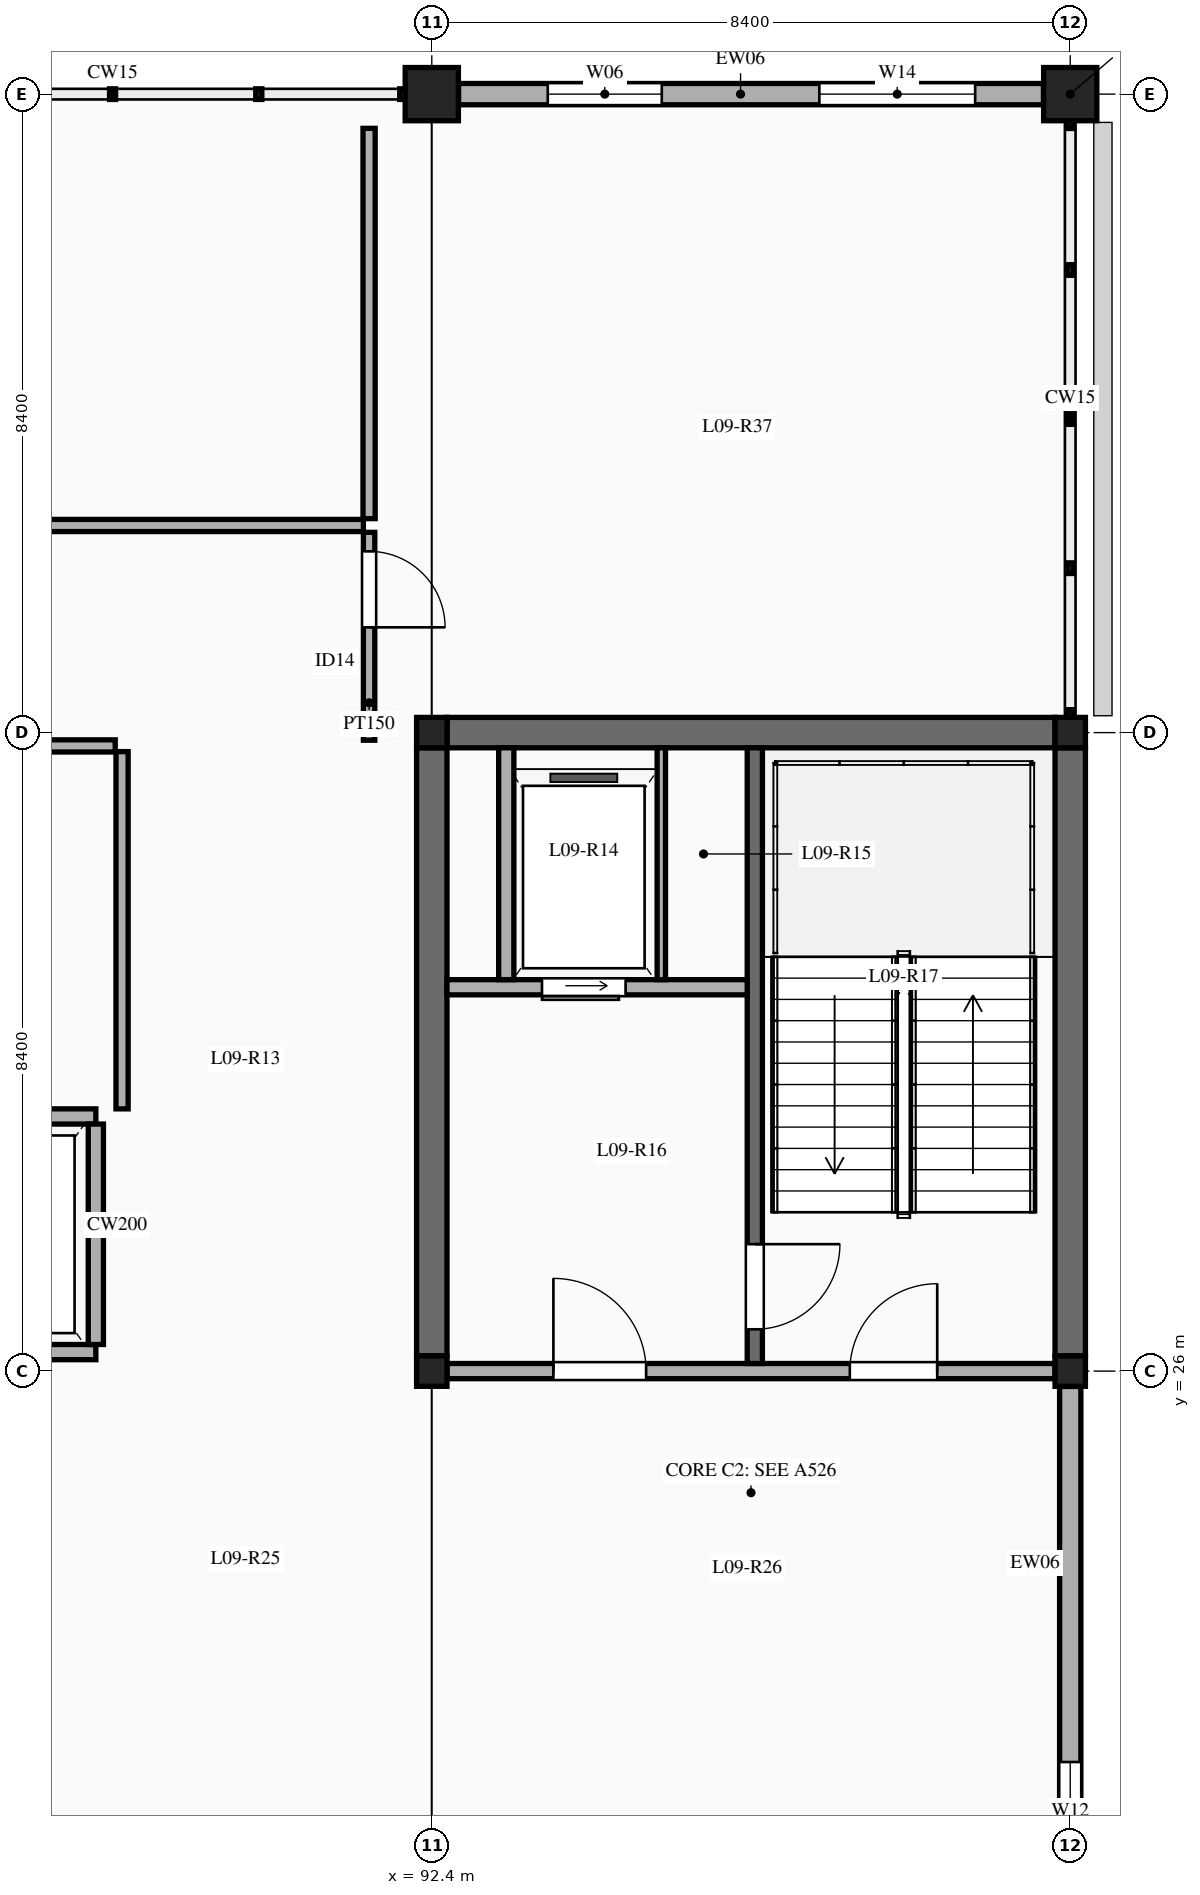
"""IFC4 building model, lengths in metres.
Left out: names, types, materials, properties, quantities, classifications, styles, units other than length and angle.
Written with IfcOpenShell. Run it as: python <this file> out.ifc"""

import sys

from ifc_helpers import new_model, si_unit, direction, frame, frame_2d, origin, origin_2d, place, context, subcontext, project, spatial, rectangle, extrude, element, fill, save


model = new_model("IFC4")
c1 = context("Model", 3, precision=1e-05, world=origin(), true_north=direction((0.0, 1.0)))
c2 = subcontext(c1, "Body", "Model", "MODEL_VIEW")
j1 = project(units=[si_unit("LENGTHUNIT", "METRE"), si_unit("PLANEANGLEUNIT", "RADIAN")], contexts=[c1])
p1 = place(None, origin())
s1 = spatial("IfcSite", under=j1, at=p1, CompositionType="ELEMENT")
p2 = place(p1, origin())
s2 = spatial("IfcBuilding", under=s1, at=p2, CompositionType="ELEMENT")
p3 = place(p2, frame((0.0, 0.0, 42.0)))
s3 = spatial("IfcBuildingStorey", under=s2, at=p3, CompositionType="ELEMENT", Elevation=42.0)
for number, where, z_axis, x_axis in (
    (1, (92.4, 26.0, 0.0), (0.0, 0.0, 1.0), (1.0, 0.0, 0.0)),
    (2, (92.4, 34.4, 0.0), (0.0, 0.0, 1.0), (1.0, 0.0, 0.0)),
):
    element("IfcColumn", number, at=place(p3, frame(where, z_axis=z_axis, x_axis=x_axis)), inside=s3, PredefinedType="COLUMN", context=c2, shape_type="SweptSolid", body=[
        extrude(rectangle(XDim=0.4, YDim=0.4, at=origin_2d()), origin(), (0.0, 0.0, 1.0), 4.5),
    ])
p4 = place(p3, frame((92.4, 42.8, 0.0), z_axis=(0.0, 0.0, 1.0), x_axis=(1.0, 0.0, 0.0)))
e3 = element("IfcColumn", 3, at=p4, inside=s3, PredefinedType="COLUMN", context=c2, shape_type="SweptSolid", body=[
    extrude(rectangle(XDim=0.7, YDim=0.7, at=origin_2d()), origin(), (0.0, 0.0, 1.0), 4.5),
])
for number, where, z_axis, x_axis in (
    (4, (100.8, 26.0, 0.0), (0.0, 0.0, 1.0), (1.0, 0.0, 0.0)),
    (5, (100.8, 34.4, 0.0), (0.0, 0.0, 1.0), (1.0, 0.0, 0.0)),
):
    element("IfcColumn", number, at=place(p3, frame(where, z_axis=z_axis, x_axis=x_axis)), inside=s3, PredefinedType="COLUMN", context=c2, shape_type="SweptSolid", body=[
        extrude(rectangle(XDim=0.4, YDim=0.4, at=origin_2d()), origin(), (0.0, 0.0, 1.0), 4.5),
    ])
p5 = place(p3, frame((100.8, 42.8, 0.0), z_axis=(0.0, 0.0, 1.0), x_axis=(1.0, 0.0, 0.0)))
e6 = element("IfcColumn", 6, at=p5, inside=s3, PredefinedType="COLUMN", context=c2, shape_type="SweptSolid", body=[
    extrude(rectangle(XDim=0.7, YDim=0.7, at=origin_2d()), origin(), (0.0, 0.0, 1.0), 4.5),
])
for number, where, z_axis, x_axis in (
    (7, (92.4, 26.2, 0.0), (0.0, 0.0, 1.0), (0.0, 1.0, 0.0)),
    (8, (100.8, 26.2, 0.0), (0.0, 0.0, 1.0), (0.0, 1.0, 0.0)),
    (9, (92.6, 34.4, 0.0), (0.0, 0.0, 1.0), (1.0, 0.0, 0.0)),
):
    element("IfcWall", number, at=place(p3, frame(where, z_axis=z_axis, x_axis=x_axis)), inside=s3, PredefinedType="SHEAR", context=c2, shape_type="SweptSolid", body=[
        extrude(rectangle(XDim=8.0, YDim=0.4, at=frame_2d((4.0, 0.0))), origin(), (0.0, 0.0, 1.0), 4.5),
    ])
p6 = place(p3, frame((92.752, 42.8, 0.0), z_axis=(0.0, 0.0, 1.0), x_axis=(1.0, 0.0, 0.0)))
e10 = element("IfcWall", 10, at=p6, inside=s3, PredefinedType="ELEMENTEDWALL", context=c2, shape_type="SweptSolid", body=[
    extrude(rectangle(XDim=7.696, YDim=0.28, at=frame_2d((3.848, 0.0))), origin(), (0.0, 0.0, 1.0), 3.55),
])
p7 = place(p6, frame((1.174, 0.0, 0.9)))
e11 = element("IfcOpeningElement", 11, at=p7, cuts=e10, PredefinedType="OPENING", context=c2, shape_type="SweptSolid", body=[
    extrude(rectangle(XDim=1.5, YDim=2.0, at=frame_2d((0.75, 1.0))), frame((0.0, 0.15, 0.0), z_axis=(0.0, -1.0, 0.0), x_axis=(1.0, 0.0, 0.0)), (0.0, 0.0, 1.0), 0.3),
])
p8 = place(p6, frame((4.747, 0.0, 0.9)))
e12 = element("IfcOpeningElement", 12, at=p8, cuts=e10, PredefinedType="OPENING", context=c2, shape_type="SweptSolid", body=[
    extrude(rectangle(XDim=2.05, YDim=2.1, at=frame_2d((1.025, 1.05))), frame((0.0, 0.15, 0.0), z_axis=(0.0, -1.0, 0.0), x_axis=(1.0, 0.0, 0.0)), (0.0, 0.0, 1.0), 0.3),
])
p9 = place(p3, frame((100.8, 17.977, 0.0), z_axis=(0.0, 0.0, 1.0), x_axis=(0.0, 1.0, 0.0)))
e13 = element("IfcWall", 13, at=p9, inside=s3, PredefinedType="ELEMENTEDWALL", context=c2, shape_type="SweptSolid", body=[
    extrude(rectangle(XDim=7.821, YDim=0.28, at=frame_2d((3.911, 0.0))), origin(), (0.0, 0.0, 1.0), 3.55),
])
p10 = place(p9, frame((1.03, 0.0, 0.9)))
e14 = element("IfcOpeningElement", 14, at=p10, cuts=e13, PredefinedType="OPENING", context=c2, shape_type="SweptSolid", body=[
    extrude(rectangle(XDim=1.85, YDim=2.05, at=frame_2d((0.925, 1.025))), frame((0.0, 0.15, 0.0), z_axis=(0.0, -1.0, 0.0), x_axis=(1.0, 0.0, 0.0)), (0.0, 0.0, 1.0), 0.3),
])
p11 = place(p3, frame((92.6, 26.0, 0.0), z_axis=(0.0, 0.0, 1.0), x_axis=(1.0, 0.0, 0.0)))
e15 = element("IfcWall", 15, at=p11, inside=s3, PredefinedType="SOLIDWALL", context=c2, shape_type="SweptSolid", body=[
    extrude(rectangle(XDim=8.0, YDim=0.2, at=frame_2d((4.0, 0.0))), origin(), (0.0, 0.0, 1.0), 3.78),
])
p12 = place(p11, frame((1.4, 0.0, 0.0)))
e16 = element("IfcOpeningElement", 16, at=p12, cuts=e15, PredefinedType="OPENING", context=c2, shape_type="SweptSolid", body=[
    extrude(rectangle(XDim=1.22, YDim=2.15, at=frame_2d((0.61, 1.075))), frame((0.0, 0.11, 0.0), z_axis=(0.0, -1.0, 0.0), x_axis=(1.0, 0.0, 0.0)), (0.0, 0.0, 1.0), 0.22),
])
p13 = place(p11, frame((5.3, 0.0, 0.0)))
e17 = element("IfcOpeningElement", 17, at=p13, cuts=e15, PredefinedType="OPENING", context=c2, shape_type="SweptSolid", body=[
    extrude(rectangle(XDim=1.15, YDim=2.15, at=frame_2d((0.575, 1.075))), frame((0.0, 0.11, 0.0), z_axis=(0.0, -1.0, 0.0), x_axis=(1.0, 0.0, 0.0)), (0.0, 0.0, 1.0), 0.22),
])
p14 = place(p3, frame((96.65, 26.1, 0.0), z_axis=(0.0, 0.0, 1.0), x_axis=(0.0, 1.0, 0.0)))
e18 = element("IfcWall", 18, at=p14, inside=s3, PredefinedType="SOLIDWALL", context=c2, shape_type="SweptSolid", body=[
    extrude(rectangle(XDim=8.1, YDim=0.2, at=frame_2d((4.05, 0.0))), origin(), (0.0, 0.0, 1.0), 4.3),
])
p15 = place(p14, frame((0.45, 0.0, 0.0)))
e19 = element("IfcOpeningElement", 19, at=p15, cuts=e18, PredefinedType="OPENING", context=c2, shape_type="SweptSolid", body=[
    extrude(rectangle(XDim=1.12, YDim=2.15, at=frame_2d((0.56, 1.075))), frame((0.0, 0.11, 0.0), z_axis=(0.0, -1.0, 0.0), x_axis=(1.0, 0.0, 0.0)), (0.0, 0.0, 1.0), 0.22),
])
p16 = place(p3, frame((92.6, 31.05, 0.0), z_axis=(0.0, 0.0, 1.0), x_axis=(1.0, 0.0, 0.0)))
e20 = element("IfcWall", 20, at=p16, inside=s3, PredefinedType="SOLIDWALL", context=c2, shape_type="SweptSolid", body=[
    extrude(rectangle(XDim=3.95, YDim=0.2, at=frame_2d((1.975, 0.0))), origin(), (0.0, 0.0, 1.0), 4.3),
])
p17 = place(p16, frame((1.25, 0.0, 0.0)))
e21 = element("IfcOpeningElement", 21, at=p17, cuts=e20, PredefinedType="OPENING", context=c2, shape_type="SweptSolid", body=[
    extrude(rectangle(XDim=1.1, YDim=2.15, at=frame_2d((0.55, 1.075))), frame((0.0, 0.11, 0.0), z_axis=(0.0, -1.0, 0.0), x_axis=(1.0, 0.0, 0.0)), (0.0, 0.0, 1.0), 0.22),
])
p18 = place(p3, frame((95.42, 31.15, 0.0), z_axis=(0.0, 0.0, 1.0), x_axis=(0.0, 1.0, 0.0)))
e22 = element("IfcWall", 22, at=p18, inside=s3, PredefinedType="PARTITIONING", context=c2, shape_type="SweptSolid", body=[
    extrude(rectangle(XDim=3.05, YDim=0.11, at=frame_2d((1.525, 0.0))), origin(), (0.0, 0.0, 1.0), 4.3),
])
p19 = place(p3, frame((93.38, 31.15, 0.0), z_axis=(0.0, 0.0, 1.0), x_axis=(0.0, 1.0, 0.0)))
e23 = element("IfcWall", 23, at=p19, inside=s3, PredefinedType="SOLIDWALL", context=c2, shape_type="SweptSolid", body=[
    extrude(rectangle(XDim=3.05, YDim=0.2, at=frame_2d((1.525, 0.0))), origin(), (0.0, 0.0, 1.0), 4.3),
])
p20 = place(p3, frame((85.62, 26.25, 0.0), z_axis=(0.0, 0.0, 1.0), x_axis=(1.0, 0.0, 0.0)))
e24 = element("IfcWall", 24, at=p20, inside=s3, PredefinedType="SOLIDWALL", context=c2, shape_type="SweptSolid", body=[
    extrude(rectangle(XDim=2.36, YDim=0.2, at=frame_2d((1.18, 0.0))), origin(), (0.0, 0.0, 1.0), 3.78),
])
p21 = place(p20, frame((0.605, 0.0, 0.0)))
e25 = element("IfcOpeningElement", 25, at=p21, cuts=e24, PredefinedType="OPENING", context=c2, shape_type="SweptSolid", body=[
    extrude(rectangle(XDim=1.15, YDim=2.2, at=frame_2d((0.575, 1.1))), frame((0.0, 0.11, 0.0), z_axis=(0.0, -1.0, 0.0), x_axis=(1.0, 0.0, 0.0)), (0.0, 0.0, 1.0), 0.22),
])
p22 = place(p3, frame((85.62, 29.35, 0.0), z_axis=(0.0, 0.0, 1.0), x_axis=(1.0, 0.0, 0.0)))
e26 = element("IfcWall", 26, at=p22, inside=s3, PredefinedType="SOLIDWALL", context=c2, shape_type="SweptSolid", body=[
    extrude(rectangle(XDim=2.36, YDim=0.2, at=frame_2d((1.18, 0.0))), origin(), (0.0, 0.0, 1.0), 4.3),
])
p23 = place(p3, frame((87.98, 26.35, 0.0), z_axis=(0.0, 0.0, 1.0), x_axis=(0.0, 1.0, 0.0)))
e27 = element("IfcWall", 27, at=p23, inside=s3, PredefinedType="SOLIDWALL", context=c2, shape_type="SweptSolid", body=[
    extrude(rectangle(XDim=2.9, YDim=0.2, at=frame_2d((1.45, 0.0))), origin(), (0.0, 0.0, 1.0), 4.03),
])
p24 = place(p3, frame((88.325, 29.45, 0.0), z_axis=(0.0, 0.0, 1.0), x_axis=(0.0, 1.0, 0.0)))
e28 = element("IfcWall", 28, at=p24, inside=s3, PredefinedType="PARTITIONING", context=c2, shape_type="SweptSolid", body=[
    extrude(rectangle(XDim=4.7, YDim=0.16, at=frame_2d((2.35, 0.0))), origin(), (0.0, 0.0, 1.0), 3.45),
])
p25 = place(p3, frame((84.405, 34.225, 0.0), z_axis=(0.0, 0.0, 1.0), x_axis=(1.0, 0.0, 0.0)))
e29 = element("IfcWall", 29, at=p25, inside=s3, PredefinedType="PARTITIONING", context=c2, shape_type="SweptSolid", body=[
    extrude(rectangle(XDim=3.83, YDim=0.16, at=frame_2d((1.915, 0.0))), origin(), (0.0, 0.0, 1.0), 3.45),
])
p26 = place(p3, frame((81.35, 37.125, 0.0), z_axis=(0.0, 0.0, 1.0), x_axis=(1.0, 0.0, 0.0)))
e30 = element("IfcWall", 30, at=p26, inside=s3, PredefinedType="PARTITIONING", context=c2, shape_type="SweptSolid", body=[
    extrude(rectangle(XDim=10.15, YDim=0.16, at=frame_2d((5.075, 0.0))), origin(), (0.0, 0.0, 1.0), 3.45),
])
p27 = place(p26, frame((4.922, 0.0, 0.0)))
e31 = element("IfcOpeningElement", 31, at=p27, cuts=e30, PredefinedType="OPENING", context=c2, shape_type="SweptSolid", body=[
    extrude(rectangle(XDim=1.06, YDim=2.18, at=frame_2d((0.53, 1.09))), frame((0.0, 0.09, 0.0), z_axis=(0.0, -1.0, 0.0), x_axis=(1.0, 0.0, 0.0)), (0.0, 0.0, 1.0), 0.18),
])
p28 = place(p3, frame((91.575, 34.3, 0.0), z_axis=(0.0, 0.0, 1.0), x_axis=(0.0, 1.0, 0.0)))
e32 = element("IfcWall", 32, at=p28, inside=s3, PredefinedType="PARTITIONING", context=c2, shape_type="SweptSolid", body=[
    extrude(rectangle(XDim=2.735, YDim=0.15, at=frame_2d((1.367, 0.0))), origin(), (0.0, 0.0, 1.0), 3.45),
])
p29 = place(p28, frame((1.485, 0.0, 0.0)))
e33 = element("IfcOpeningElement", 33, at=p29, cuts=e32, PredefinedType="OPENING", context=c2, shape_type="SweptSolid", body=[
    extrude(rectangle(XDim=1.0, YDim=2.15, at=frame_2d((0.5, 1.075))), frame((0.0, 0.085, 0.0), z_axis=(0.0, -1.0, 0.0), x_axis=(1.0, 0.0, 0.0)), (0.0, 0.0, 1.0), 0.17),
])
p30 = place(p3, frame((91.575, 37.215, 0.0), z_axis=(0.0, 0.0, 1.0), x_axis=(0.0, 1.0, 0.0)))
e34 = element("IfcWall", 34, at=p30, inside=s3, PredefinedType="PARTITIONING", context=c2, shape_type="SweptSolid", body=[
    extrude(rectangle(XDim=5.135, YDim=0.16, at=frame_2d((2.567, 0.0))), origin(), (0.0, 0.0, 1.0), 3.45),
])
p31 = place(p7, origin())
e35 = element("IfcWindow", 35, at=p31, inside=s3, PartitioningType="DOUBLE_PANEL_VERTICAL", PredefinedType="WINDOW", context=c2, shape_type="SweptSolid", body=[
    extrude(rectangle(XDim=1.5, YDim=2.0, at=frame_2d((0.75, 1.0))), frame((0.0, 0.03, 0.0), z_axis=(0.0, -1.0, 0.0), x_axis=(1.0, 0.0, 0.0)), (0.0, 0.0, 1.0), 0.06),
])
fill(e11, e35)
p32 = place(p8, origin())
e36 = element("IfcWindow", 36, at=p32, inside=s3, PartitioningType="TRIPLE_PANEL_VERTICAL", PredefinedType="WINDOW", context=c2, shape_type="SweptSolid", body=[
    extrude(rectangle(XDim=2.05, YDim=2.1, at=frame_2d((1.025, 1.05))), frame((0.0, 0.03, 0.0), z_axis=(0.0, -1.0, 0.0), x_axis=(1.0, 0.0, 0.0)), (0.0, 0.0, 1.0), 0.06),
])
fill(e12, e36)
p33 = place(p10, origin())
e37 = element("IfcWindow", 37, at=p33, inside=s3, PartitioningType="DOUBLE_PANEL_HORIZONTAL", PredefinedType="WINDOW", context=c2, shape_type="SweptSolid", body=[
    extrude(rectangle(XDim=1.85, YDim=2.05, at=frame_2d((0.925, 1.025))), frame((0.0, 0.03, 0.0), z_axis=(0.0, -1.0, 0.0), x_axis=(1.0, 0.0, 0.0)), (0.0, 0.0, 1.0), 0.06),
])
fill(e14, e37)
p34 = place(p12, origin())
e38 = element("IfcDoor", 38, at=p34, inside=s3, OperationType="SINGLE_SWING_LEFT", PredefinedType="DOOR", context=c2, shape_type="SweptSolid", body=[
    extrude(rectangle(XDim=1.22, YDim=2.15, at=frame_2d((0.61, 1.075))), frame((0.0, 0.025, 0.0), z_axis=(0.0, -1.0, 0.0), x_axis=(1.0, 0.0, 0.0)), (0.0, 0.0, 1.0), 0.05),
])
fill(e16, e38)
p35 = place(p13, origin())
e39 = element("IfcDoor", 39, at=p35, inside=s3, OperationType="SINGLE_SWING_RIGHT", PredefinedType="DOOR", context=c2, shape_type="SweptSolid", body=[
    extrude(rectangle(XDim=1.15, YDim=2.15, at=frame_2d((0.575, 1.075))), frame((0.0, 0.025, 0.0), z_axis=(0.0, -1.0, 0.0), x_axis=(1.0, 0.0, 0.0)), (0.0, 0.0, 1.0), 0.05),
])
fill(e17, e39)
p36 = place(p15, frame((1.12, 0.0, 0.0), z_axis=(0.0, 0.0, 1.0), x_axis=(-1.0, 0.0, 0.0)))
e40 = element("IfcDoor", 40, at=p36, inside=s3, OperationType="SINGLE_SWING_LEFT", PredefinedType="DOOR", context=c2, shape_type="SweptSolid", body=[
    extrude(rectangle(XDim=1.12, YDim=2.15, at=frame_2d((0.56, 1.075))), frame((0.0, 0.025, 0.0), z_axis=(0.0, -1.0, 0.0), x_axis=(1.0, 0.0, 0.0)), (0.0, 0.0, 1.0), 0.05),
])
fill(e19, e40)
p37 = place(p17, frame((1.1, 0.0, 0.0), z_axis=(0.0, 0.0, 1.0), x_axis=(-1.0, 0.0, 0.0)))
e41 = element("IfcDoor", 41, at=p37, inside=s3, OperationType="SLIDING_TO_LEFT", PredefinedType="DOOR", context=c2, shape_type="SweptSolid", body=[
    extrude(rectangle(XDim=1.1, YDim=2.15, at=frame_2d((0.55, 1.075))), frame((0.0, 0.025, 0.0), z_axis=(0.0, -1.0, 0.0), x_axis=(1.0, 0.0, 0.0)), (0.0, 0.0, 1.0), 0.05),
])
fill(e21, e41)
p38 = place(p29, frame((1.0, 0.0, 0.0), z_axis=(0.0, 0.0, 1.0), x_axis=(-1.0, 0.0, 0.0)))
e42 = element("IfcDoor", 42, at=p38, inside=s3, OperationType="SINGLE_SWING_RIGHT", PredefinedType="DOOR", context=c2, shape_type="SweptSolid", body=[
    extrude(rectangle(XDim=1.0, YDim=2.15, at=frame_2d((0.5, 1.075))), frame((0.0, 0.025, 0.0), z_axis=(0.0, -1.0, 0.0), x_axis=(1.0, 0.0, 0.0)), (0.0, 0.0, 1.0), 0.05),
])
fill(e33, e42)
save(model, sys.argv[1])
